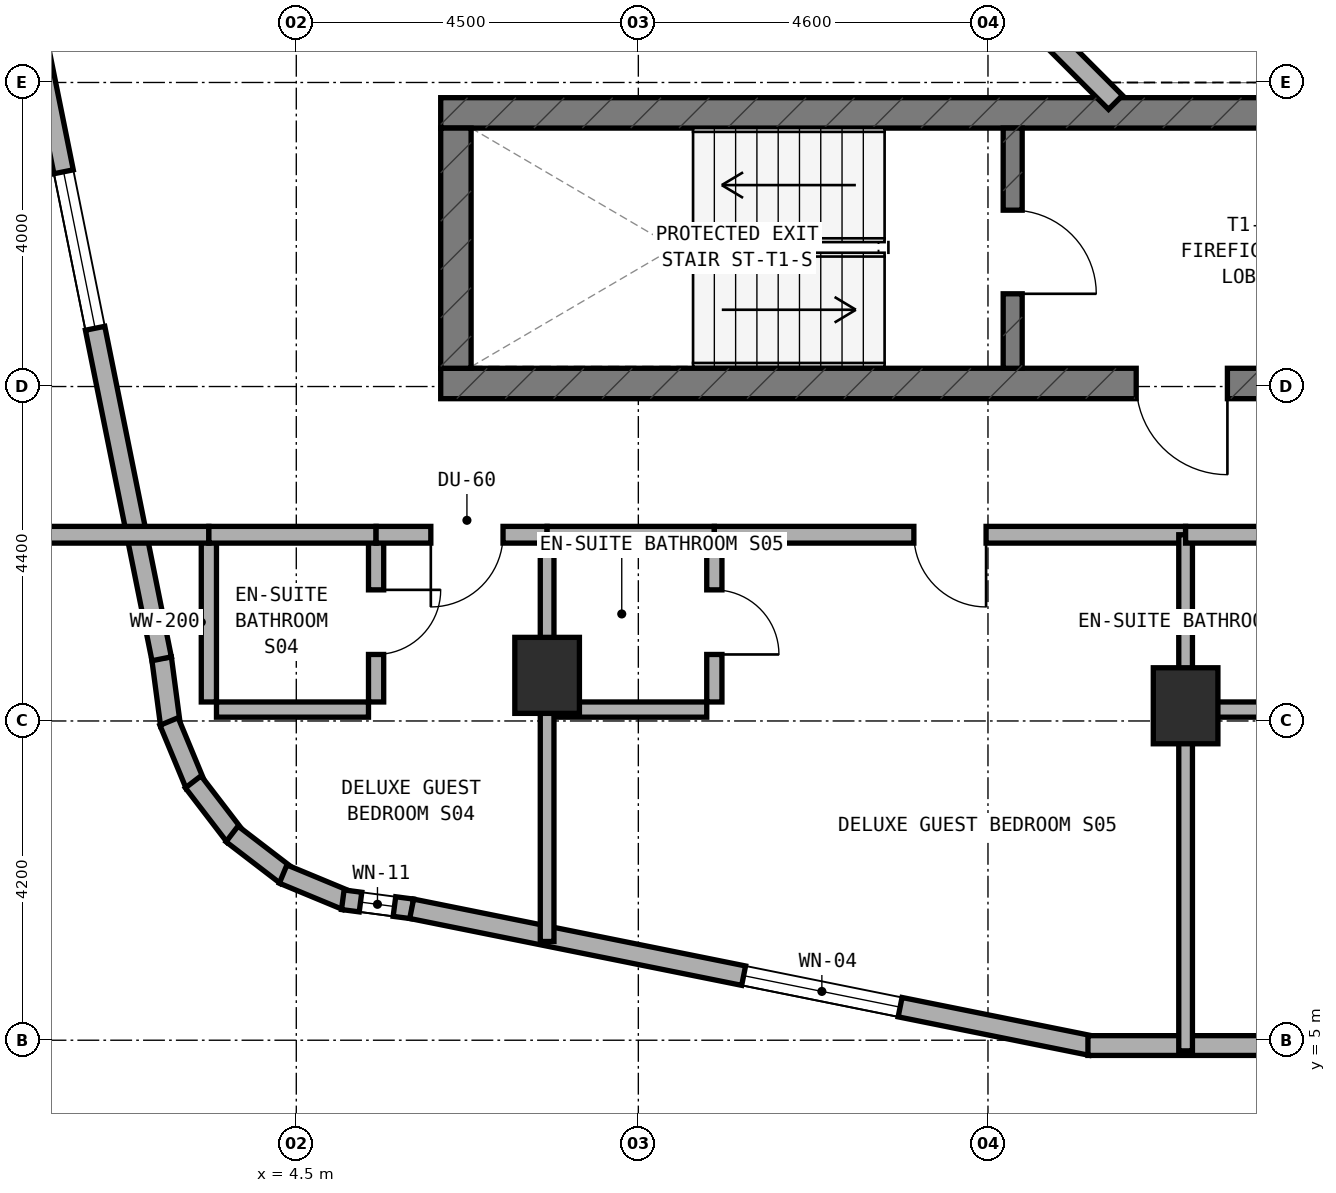
"""IFC4 building model, lengths in metres.
Left out: names, types, materials, properties, quantities, classifications, styles, units other than length and angle.
Written with IfcOpenShell. Run it as: python <this file> out.ifc"""

import sys

from ifc_helpers import new_model, si_unit, direction, frame, frame_2d, origin, origin_2d, place, context, subcontext, project, spatial, rectangle, extrude, element, fill, save


model = new_model("IFC4")
c1 = context("Model", 3, precision=1e-05, world=origin(), true_north=direction((0.0, 1.0)))
c2 = subcontext(c1, "Body", "Model", "MODEL_VIEW")
j1 = project(units=[si_unit("LENGTHUNIT", "METRE"), si_unit("PLANEANGLEUNIT", "RADIAN")], contexts=[c1])
p1 = place(None, origin())
s1 = spatial("IfcSite", under=j1, at=p1, CompositionType="ELEMENT")
p2 = place(p1, origin())
s2 = spatial("IfcBuilding", under=s1, at=p2, CompositionType="ELEMENT")
p3 = place(p2, frame((0.0, 0.0, 134.5)))
s3 = spatial("IfcBuildingStorey", under=s2, at=p3, CompositionType="ELEMENT", Elevation=134.5)
p4 = place(p3, frame((6.4, 13.64, 0.0), z_axis=(0.0, 0.0, 1.0), x_axis=(1.0, 0.0, 0.0)))
e1 = element("IfcWall", 1, at=p4, inside=s3, PredefinedType="SHEAR", context=c2, shape_type="SweptSolid", body=[
    extrude(rectangle(XDim=24.4, YDim=0.4, at=frame_2d((12.2, 0.0))), origin(), (0.0, 0.0, 1.0), 3.5),
])
p5 = place(p4, frame((9.15, 0.0, 0.0)))
e2 = element("IfcOpeningElement", 2, at=p5, cuts=e1, PredefinedType="OPENING", context=c2, shape_type="SweptSolid", body=[
    extrude(rectangle(XDim=1.2, YDim=2.15, at=frame_2d((0.6, 1.075))), frame((0.0, 0.21, 0.0), z_axis=(0.0, -1.0, 0.0), x_axis=(1.0, 0.0, 0.0)), (0.0, 0.0, 1.0), 0.42),
])
p6 = place(p4, frame((16.94, 0.0, 0.0)))
e3 = element("IfcOpeningElement", 3, at=p6, cuts=e1, PredefinedType="OPENING", context=c2, shape_type="SweptSolid", body=[
    extrude(rectangle(XDim=0.85, YDim=2.1, at=frame_2d((0.425, 1.05))), frame((0.0, 0.21, 0.0), z_axis=(0.0, -1.0, 0.0), x_axis=(1.0, 0.0, 0.0)), (0.0, 0.0, 1.0), 0.42),
])
p7 = place(p4, frame((18.783, 0.0, 0.0)))
e4 = element("IfcOpeningElement", 4, at=p7, cuts=e1, PredefinedType="OPENING", context=c2, shape_type="SweptSolid", body=[
    extrude(rectangle(XDim=1.1, YDim=2.15, at=frame_2d((0.55, 1.075))), frame((0.0, 0.21, 0.0), z_axis=(0.0, -1.0, 0.0), x_axis=(1.0, 0.0, 0.0)), (0.0, 0.0, 1.0), 0.42),
])
p8 = place(p4, frame((20.65, 0.0, 0.0)))
e5 = element("IfcOpeningElement", 5, at=p8, cuts=e1, PredefinedType="OPENING", context=c2, shape_type="SweptSolid", body=[
    extrude(rectangle(XDim=1.1, YDim=2.15, at=frame_2d((0.55, 1.075))), frame((0.0, 0.21, 0.0), z_axis=(0.0, -1.0, 0.0), x_axis=(1.0, 0.0, 0.0)), (0.0, 0.0, 1.0), 0.42),
])
p9 = place(p4, frame((22.517, 0.0, 0.0)))
e6 = element("IfcOpeningElement", 6, at=p9, cuts=e1, PredefinedType="OPENING", context=c2, shape_type="SweptSolid", body=[
    extrude(rectangle(XDim=1.1, YDim=2.15, at=frame_2d((0.55, 1.075))), frame((0.0, 0.21, 0.0), z_axis=(0.0, -1.0, 0.0), x_axis=(1.0, 0.0, 0.0)), (0.0, 0.0, 1.0), 0.42),
])
p10 = place(p3, frame((6.4, 17.2, 0.0), z_axis=(0.0, 0.0, 1.0), x_axis=(1.0, 0.0, 0.0)))
e7 = element("IfcWall", 7, at=p10, inside=s3, PredefinedType="SHEAR", context=c2, shape_type="SweptSolid", body=[
    extrude(rectangle(XDim=24.4, YDim=0.4, at=frame_2d((12.2, 0.0))), origin(), (0.0, 0.0, 1.0), 3.5),
])
p11 = place(p3, frame((6.6, 13.84, 0.0), z_axis=(0.0, 0.0, 1.0), x_axis=(0.0, 1.0, 0.0)))
e8 = element("IfcWall", 8, at=p11, inside=s3, PredefinedType="SHEAR", context=c2, shape_type="SweptSolid", body=[
    extrude(rectangle(XDim=3.16, YDim=0.4, at=frame_2d((1.58, 0.0))), origin(), (0.0, 0.0, 1.0), 3.5),
])
p12 = place(p3, frame((13.925, 13.84, 0.0), z_axis=(0.0, 0.0, 1.0), x_axis=(0.0, 1.0, 0.0)))
e9 = element("IfcWall", 9, at=p12, inside=s3, PredefinedType="STANDARD", context=c2, shape_type="SweptSolid", body=[
    extrude(rectangle(XDim=3.16, YDim=0.25, at=frame_2d((1.58, 0.0))), origin(), (0.0, 0.0, 1.0), 3.22),
])
p13 = place(p12, frame((0.98, 0.0, 0.0)))
e10 = element("IfcOpeningElement", 10, at=p13, cuts=e9, PredefinedType="OPENING", context=c2, shape_type="SweptSolid", body=[
    extrude(rectangle(XDim=1.1, YDim=2.15, at=frame_2d((0.55, 1.075))), frame((0.0, 0.135, 0.0), z_axis=(0.0, -1.0, 0.0), x_axis=(1.0, 0.0, 0.0)), (0.0, 0.0, 1.0), 0.27),
])
for number, where, z_axis, x_axis in (
    (11, (16.2, 9.4, 0.0), (0.0, 0.0, 1.0), (1.0, 0.0, 0.0)),
    (12, (7.8, 9.8, 0.0), (0.0, 0.0, 1.0), (1.0, 0.0, 0.0)),
):
    element("IfcColumn", number, at=place(p3, frame(where, z_axis=z_axis, x_axis=x_axis)), inside=s3, PredefinedType="COLUMN", context=c2, shape_type="SweptSolid", body=[
        extrude(rectangle(XDim=0.85, YDim=1.0, at=origin_2d()), origin(), (0.0, 0.0, 1.0), 3.5),
    ])
p14 = place(p3, frame((2.728, 10.025, 0.0), z_axis=(0.0, 0.0, 1.0), x_axis=(0.130953706898, -0.991388484223, 0.0)))
e13 = element("IfcWall", 13, at=p14, inside=s3, PredefinedType="STANDARD", context=c2, shape_type="SweptSolid", body=[
    extrude(rectangle(XDim=0.885, YDim=0.26, at=frame_2d((0.443, 0.0))), origin(), (0.0, 0.0, 1.0), 3.22),
])
p15 = place(p3, frame((2.826, 9.193, 0.0), z_axis=(0.0, 0.0, 1.0), x_axis=(0.383290660547, -0.923627776508, 0.0)))
e14 = element("IfcWall", 14, at=p15, inside=s3, PredefinedType="STANDARD", context=c2, shape_type="SweptSolid", body=[
    extrude(rectangle(XDim=0.903, YDim=0.26, at=frame_2d((0.452, 0.0))), origin(), (0.0, 0.0, 1.0), 3.22),
])
p16 = place(p3, frame((3.144, 8.399, 0.0), z_axis=(0.0, 0.0, 1.0), x_axis=(0.608624690463, -0.793458244748, 0.0)))
e15 = element("IfcWall", 15, at=p16, inside=s3, PredefinedType="STANDARD", context=c2, shape_type="SweptSolid", body=[
    extrude(rectangle(XDim=0.902, YDim=0.26, at=frame_2d((0.451, 0.0))), origin(), (0.0, 0.0, 1.0), 3.22),
])
p17 = place(p3, frame((3.655, 7.714, 0.0), z_axis=(0.0, 0.0, 1.0), x_axis=(0.793558456666, -0.608494022858, 0.0)))
e16 = element("IfcWall", 16, at=p17, inside=s3, PredefinedType="STANDARD", context=c2, shape_type="SweptSolid", body=[
    extrude(rectangle(XDim=0.902, YDim=0.26, at=frame_2d((0.451, 0.0))), origin(), (0.0, 0.0, 1.0), 3.22),
])
p18 = place(p3, frame((4.327, 7.186, 0.0), z_axis=(0.0, 0.0, 1.0), x_axis=(0.923683767999, -0.383155708213, 0.0)))
e17 = element("IfcWall", 17, at=p18, inside=s3, PredefinedType="STANDARD", context=c2, shape_type="SweptSolid", body=[
    extrude(rectangle(XDim=0.903, YDim=0.26, at=frame_2d((0.451, 0.0))), origin(), (0.0, 0.0, 1.0), 3.22),
])
p19 = place(p3, frame((5.112, 6.848, 0.0), z_axis=(0.0, 0.0, 1.0), x_axis=(0.991487658083, -0.130200706103, 0.0)))
e18 = element("IfcWall", 18, at=p19, inside=s3, PredefinedType="STANDARD", context=c2, shape_type="SweptSolid", body=[
    extrude(rectangle(XDim=0.921, YDim=0.26, at=frame_2d((0.46, 0.0))), origin(), (0.0, 0.0, 1.0), 3.22),
])
p20 = place(p19, frame((0.235, 0.0, 0.85)))
e19 = element("IfcOpeningElement", 19, at=p20, cuts=e18, PredefinedType="OPENING", context=c2, shape_type="SweptSolid", body=[
    extrude(rectangle(XDim=0.45, YDim=1.5, at=frame_2d((0.225, 0.75))), frame((0.0, 0.14, 0.0), z_axis=(0.0, -1.0, 0.0), x_axis=(1.0, 0.0, 0.0)), (0.0, 0.0, 1.0), 0.28),
])
p21 = place(p3, frame((6.018, 6.729, 0.0), z_axis=(0.0, 0.0, 1.0), x_axis=(0.980317172899, -0.197429077186, 0.0)))
e20 = element("IfcWall", 20, at=p21, inside=s3, PredefinedType="STANDARD", context=c2, shape_type="SweptSolid", body=[
    extrude(rectangle(XDim=9.117, YDim=0.26, at=frame_2d((4.559, 0.0))), origin(), (0.0, 0.0, 1.0), 3.22),
])
p22 = place(p21, frame((4.455, 0.0, 0.85)))
e21 = element("IfcOpeningElement", 21, at=p22, cuts=e20, PredefinedType="OPENING", context=c2, shape_type="SweptSolid", body=[
    extrude(rectangle(XDim=2.1, YDim=1.5, at=frame_2d((1.05, 0.75))), frame((0.0, 0.14, 0.0), z_axis=(0.0, -1.0, 0.0), x_axis=(1.0, 0.0, 0.0)), (0.0, 0.0, 1.0), 0.28),
])
p23 = place(p3, frame((14.915, 4.93, 0.0), z_axis=(0.0, 0.0, 1.0), x_axis=(1.0, 0.0, 0.0)))
e22 = element("IfcWall", 22, at=p23, inside=s3, PredefinedType="STANDARD", context=c2, shape_type="SweptSolid", body=[
    extrude(rectangle(XDim=12.135, YDim=0.26, at=frame_2d((6.067, 0.0))), origin(), (0.0, 0.0, 1.0), 3.22),
])
p24 = place(p23, frame((5.485, 0.0, 0.0)))
e23 = element("IfcOpeningElement", 23, at=p24, cuts=e22, PredefinedType="OPENING", context=c2, shape_type="SweptSolid", body=[
    extrude(rectangle(XDim=1.2, YDim=2.15, at=frame_2d((0.6, 1.075))), frame((0.0, 0.14, 0.0), z_axis=(0.0, -1.0, 0.0), x_axis=(1.0, 0.0, 0.0)), (0.0, 0.0, 1.0), 0.28),
])
p25 = place(p23, frame((2.26, 0.0, 0.85)))
e24 = element("IfcOpeningElement", 24, at=p25, cuts=e22, PredefinedType="OPENING", context=c2, shape_type="SweptSolid", body=[
    extrude(rectangle(XDim=2.1, YDim=1.5, at=frame_2d((1.05, 0.75))), frame((0.0, 0.14, 0.0), z_axis=(0.0, -1.0, 0.0), x_axis=(1.0, 0.0, 0.0)), (0.0, 0.0, 1.0), 0.28),
])
p26 = place(p23, frame((7.61, 0.0, 0.85)))
e25 = element("IfcOpeningElement", 25, at=p26, cuts=e22, PredefinedType="OPENING", context=c2, shape_type="SweptSolid", body=[
    extrude(rectangle(XDim=2.1, YDim=1.5, at=frame_2d((1.05, 0.75))), frame((0.0, 0.14, 0.0), z_axis=(0.0, -1.0, 0.0), x_axis=(1.0, 0.0, 0.0)), (0.0, 0.0, 1.0), 0.28),
])
p27 = place(p3, frame((0.916, 19.02, 0.0), z_axis=(0.0, 0.0, 1.0), x_axis=(0.197435082048, -0.980315963543, 0.0)))
e26 = element("IfcWall", 26, at=p27, inside=s3, PredefinedType="STANDARD", context=c2, shape_type="SweptSolid", body=[
    extrude(rectangle(XDim=9.183, YDim=0.26, at=frame_2d((4.591, 0.0))), origin(), (0.0, 0.0, 1.0), 3.22),
])
p28 = place(p27, frame((2.647, 0.0, 0.85)))
e27 = element("IfcOpeningElement", 27, at=p28, cuts=e26, PredefinedType="OPENING", context=c2, shape_type="SweptSolid", body=[
    extrude(rectangle(XDim=2.1, YDim=1.5, at=frame_2d((1.05, 0.75))), frame((0.0, 0.14, 0.0), z_axis=(0.0, -1.0, 0.0), x_axis=(1.0, 0.0, 0.0)), (0.0, 0.0, 1.0), 0.28),
])
p29 = place(p3, frame((13.444, 19.172, 0.0), z_axis=(0.0, 0.0, 1.0), x_axis=(0.707059717605, -0.707153841636, 0.0)))
e28 = element("IfcWall", 28, at=p29, inside=s3, PredefinedType="STANDARD", context=c2, shape_type="SweptSolid", body=[
    extrude(rectangle(XDim=2.594, YDim=0.26, at=frame_2d((1.297, 0.0))), origin(), (0.0, 0.0, 1.0), 3.22),
])
p30 = place(p3, frame((5.55, 9.45, 0.0), z_axis=(0.0, 0.0, 1.0), x_axis=(0.0, 1.0, 0.0)))
e29 = element("IfcWall", 29, at=p30, inside=s3, PredefinedType="PLUMBINGWALL", context=c2, shape_type="SweptSolid", body=[
    extrude(rectangle(XDim=2.1, YDim=0.2, at=frame_2d((1.05, 0.0))), origin(), (0.0, 0.0, 1.0), 3.22),
])
p31 = place(p30, frame((0.625, 0.0, 0.0)))
e30 = element("IfcOpeningElement", 30, at=p31, cuts=e29, PredefinedType="OPENING", context=c2, shape_type="SweptSolid", body=[
    extrude(rectangle(XDim=0.85, YDim=2.1, at=frame_2d((0.425, 1.05))), frame((0.0, 0.11, 0.0), z_axis=(0.0, -1.0, 0.0), x_axis=(1.0, 0.0, 0.0)), (0.0, 0.0, 1.0), 0.22),
])
p32 = place(p3, frame((3.45, 9.35, 0.0), z_axis=(0.0, 0.0, 1.0), x_axis=(1.0, 0.0, 0.0)))
e31 = element("IfcWall", 31, at=p32, inside=s3, PredefinedType="PLUMBINGWALL", context=c2, shape_type="SweptSolid", body=[
    extrude(rectangle(XDim=2.0, YDim=0.2, at=frame_2d((1.0, 0.0))), origin(), (0.0, 0.0, 1.0), 3.22),
])
p33 = place(p3, frame((3.35, 9.45, 0.0), z_axis=(0.0, 0.0, 1.0), x_axis=(0.0, 1.0, 0.0)))
e32 = element("IfcWall", 32, at=p33, inside=s3, PredefinedType="PLUMBINGWALL", context=c2, shape_type="SweptSolid", body=[
    extrude(rectangle(XDim=2.1, YDim=0.2, at=frame_2d((1.05, 0.0))), origin(), (0.0, 0.0, 1.0), 3.22),
])
p34 = place(p3, frame((0.96, 11.65, 0.0), z_axis=(0.0, 0.0, 1.0), x_axis=(1.0, 0.0, 0.0)))
e33 = element("IfcWall", 33, at=p34, inside=s3, PredefinedType="SOLIDWALL", context=c2, shape_type="SweptSolid", body=[
    extrude(rectangle(XDim=2.39, YDim=0.22, at=frame_2d((1.195, 0.0))), origin(), (0.0, 0.0, 1.0), 3.22),
])
p35 = place(p3, frame((3.35, 11.65, 0.0), z_axis=(0.0, 0.0, 1.0), x_axis=(1.0, 0.0, 0.0)))
e34 = element("IfcWall", 34, at=p35, inside=s3, PredefinedType="SOLIDWALL", context=c2, shape_type="SweptSolid", body=[
    extrude(rectangle(XDim=2.2, YDim=0.22, at=frame_2d((1.1, 0.0))), origin(), (0.0, 0.0, 1.0), 3.22),
])
p36 = place(p3, frame((5.55, 11.65, 0.0), z_axis=(0.0, 0.0, 1.0), x_axis=(1.0, 0.0, 0.0)))
e35 = element("IfcWall", 35, at=p36, inside=s3, PredefinedType="SOLIDWALL", context=c2, shape_type="SweptSolid", body=[
    extrude(rectangle(XDim=2.25, YDim=0.22, at=frame_2d((1.125, 0.0))), origin(), (0.0, 0.0, 1.0), 2.695),
])
p37 = place(p36, frame((0.72, 0.0, 0.0)))
e36 = element("IfcOpeningElement", 36, at=p37, cuts=e35, PredefinedType="OPENING", context=c2, shape_type="SweptSolid", body=[
    extrude(rectangle(XDim=0.95, YDim=2.1, at=frame_2d((0.475, 1.05))), frame((0.0, 0.12, 0.0), z_axis=(0.0, -1.0, 0.0), x_axis=(1.0, 0.0, 0.0)), (0.0, 0.0, 1.0), 0.24),
])
p38 = place(p3, frame((7.8, 6.299, 0.0), z_axis=(0.0, 0.0, 1.0), x_axis=(0.0, 1.0, 0.0)))
e37 = element("IfcWall", 37, at=p38, inside=s3, PredefinedType="SOLIDWALL", context=c2, shape_type="SweptSolid", body=[
    extrude(rectangle(XDim=5.351, YDim=0.18, at=frame_2d((2.675, 0.0))), origin(), (0.0, 0.0, 1.0), 2.695),
])
p39 = place(p3, frame((10.0, 9.45, 0.0), z_axis=(0.0, 0.0, 1.0), x_axis=(0.0, 1.0, 0.0)))
e38 = element("IfcWall", 38, at=p39, inside=s3, PredefinedType="PLUMBINGWALL", context=c2, shape_type="SweptSolid", body=[
    extrude(rectangle(XDim=2.1, YDim=0.2, at=frame_2d((1.05, 0.0))), origin(), (0.0, 0.0, 1.0), 2.835),
])
p40 = place(p39, frame((0.625, 0.0, 0.0)))
e39 = element("IfcOpeningElement", 39, at=p40, cuts=e38, PredefinedType="OPENING", context=c2, shape_type="SweptSolid", body=[
    extrude(rectangle(XDim=0.85, YDim=2.1, at=frame_2d((0.425, 1.05))), frame((0.0, 0.11, 0.0), z_axis=(0.0, -1.0, 0.0), x_axis=(1.0, 0.0, 0.0)), (0.0, 0.0, 1.0), 0.22),
])
p41 = place(p3, frame((7.9, 9.35, 0.0), z_axis=(0.0, 0.0, 1.0), x_axis=(1.0, 0.0, 0.0)))
e40 = element("IfcWall", 40, at=p41, inside=s3, PredefinedType="PLUMBINGWALL", context=c2, shape_type="SweptSolid", body=[
    extrude(rectangle(XDim=2.0, YDim=0.2, at=frame_2d((1.0, 0.0))), origin(), (0.0, 0.0, 1.0), 3.22),
])
p42 = place(p3, frame((7.8, 11.65, 0.0), z_axis=(0.0, 0.0, 1.0), x_axis=(1.0, 0.0, 0.0)))
e41 = element("IfcWall", 41, at=p42, inside=s3, PredefinedType="SOLIDWALL", context=c2, shape_type="SweptSolid", body=[
    extrude(rectangle(XDim=2.2, YDim=0.22, at=frame_2d((1.1, 0.0))), origin(), (0.0, 0.0, 1.0), 2.695),
])
p43 = place(p3, frame((10.0, 11.65, 0.0), z_axis=(0.0, 0.0, 1.0), x_axis=(1.0, 0.0, 0.0)))
e42 = element("IfcWall", 42, at=p43, inside=s3, PredefinedType="SOLIDWALL", context=c2, shape_type="SweptSolid", body=[
    extrude(rectangle(XDim=6.2, YDim=0.22, at=frame_2d((3.1, 0.0))), origin(), (0.0, 0.0, 1.0), 2.695),
])
p44 = place(p43, frame((2.625, 0.0, 0.0)))
e43 = element("IfcOpeningElement", 43, at=p44, cuts=e42, PredefinedType="OPENING", context=c2, shape_type="SweptSolid", body=[
    extrude(rectangle(XDim=0.95, YDim=2.1, at=frame_2d((0.475, 1.05))), frame((0.0, 0.12, 0.0), z_axis=(0.0, -1.0, 0.0), x_axis=(1.0, 0.0, 0.0)), (0.0, 0.0, 1.0), 0.24),
])
p45 = place(p3, frame((16.2, 4.86, 0.0), z_axis=(0.0, 0.0, 1.0), x_axis=(0.0, 1.0, 0.0)))
e44 = element("IfcWall", 44, at=p45, inside=s3, PredefinedType="SOLIDWALL", context=c2, shape_type="SweptSolid", body=[
    extrude(rectangle(XDim=6.79, YDim=0.18, at=frame_2d((3.395, 0.0))), origin(), (0.0, 0.0, 1.0), 2.695),
])
p46 = place(p3, frame((16.3, 9.35, 0.0), z_axis=(0.0, 0.0, 1.0), x_axis=(1.0, 0.0, 0.0)))
e45 = element("IfcWall", 45, at=p46, inside=s3, PredefinedType="PLUMBINGWALL", context=c2, shape_type="SweptSolid", body=[
    extrude(rectangle(XDim=2.0, YDim=0.2, at=frame_2d((1.0, 0.0))), origin(), (0.0, 0.0, 1.0), 2.835),
])
p47 = place(p3, frame((16.2, 11.65, 0.0), z_axis=(0.0, 0.0, 1.0), x_axis=(1.0, 0.0, 0.0)))
e46 = element("IfcWall", 46, at=p47, inside=s3, PredefinedType="SOLIDWALL", context=c2, shape_type="SweptSolid", body=[
    extrude(rectangle(XDim=2.2, YDim=0.22, at=frame_2d((1.1, 0.0))), origin(), (0.0, 0.0, 1.0), 2.695),
])
p48 = place(p22, origin())
e47 = element("IfcWindow", 47, at=p48, inside=s3, PartitioningType="SINGLE_PANEL", PredefinedType="WINDOW", context=c2, shape_type="SweptSolid", body=[
    extrude(rectangle(XDim=2.1, YDim=1.5, at=frame_2d((1.05, 0.75))), frame((0.0, 0.03, 0.0), z_axis=(0.0, -1.0, 0.0), x_axis=(1.0, 0.0, 0.0)), (0.0, 0.0, 1.0), 0.06),
])
fill(e21, e47)
p49 = place(p28, origin())
e48 = element("IfcWindow", 48, at=p49, inside=s3, PartitioningType="SINGLE_PANEL", PredefinedType="WINDOW", context=c2, shape_type="SweptSolid", body=[
    extrude(rectangle(XDim=2.1, YDim=1.5, at=frame_2d((1.05, 0.75))), frame((0.0, 0.03, 0.0), z_axis=(0.0, -1.0, 0.0), x_axis=(1.0, 0.0, 0.0)), (0.0, 0.0, 1.0), 0.06),
])
fill(e27, e48)
p50 = place(p20, origin())
e49 = element("IfcWindow", 49, at=p50, inside=s3, PartitioningType="SINGLE_PANEL", PredefinedType="WINDOW", context=c2, shape_type="SweptSolid", body=[
    extrude(rectangle(XDim=0.45, YDim=1.5, at=frame_2d((0.225, 0.75))), frame((0.0, 0.03, 0.0), z_axis=(0.0, -1.0, 0.0), x_axis=(1.0, 0.0, 0.0)), (0.0, 0.0, 1.0), 0.06),
])
fill(e19, e49)
p51 = place(p13, frame((1.1, 0.0, 0.0), z_axis=(0.0, 0.0, 1.0), x_axis=(-1.0, 0.0, 0.0)))
e50 = element("IfcDoor", 50, at=p51, inside=s3, OperationType="SINGLE_SWING_RIGHT", PredefinedType="DOOR", context=c2, shape_type="SweptSolid", body=[
    extrude(rectangle(XDim=1.1, YDim=2.15, at=frame_2d((0.55, 1.075))), frame((0.0, 0.025, 0.0), z_axis=(0.0, -1.0, 0.0), x_axis=(1.0, 0.0, 0.0)), (0.0, 0.0, 1.0), 0.05),
])
fill(e10, e50)
p52 = place(p5, frame((1.2, 0.0, 0.0), z_axis=(0.0, 0.0, 1.0), x_axis=(-1.0, 0.0, 0.0)))
e51 = element("IfcDoor", 51, at=p52, inside=s3, OperationType="SINGLE_SWING_LEFT", PredefinedType="DOOR", context=c2, shape_type="SweptSolid", body=[
    extrude(rectangle(XDim=1.2, YDim=2.15, at=frame_2d((0.6, 1.075))), frame((0.0, 0.025, 0.0), z_axis=(0.0, -1.0, 0.0), x_axis=(1.0, 0.0, 0.0)), (0.0, 0.0, 1.0), 0.05),
])
fill(e2, e51)
p53 = place(p31, frame((0.85, 0.0, 0.0), z_axis=(0.0, 0.0, 1.0), x_axis=(-1.0, 0.0, 0.0)))
e52 = element("IfcDoor", 52, at=p53, inside=s3, OperationType="SINGLE_SWING_LEFT", PredefinedType="DOOR", context=c2, shape_type="SweptSolid", body=[
    extrude(rectangle(XDim=0.85, YDim=2.1, at=frame_2d((0.425, 1.05))), frame((0.0, 0.025, 0.0), z_axis=(0.0, -1.0, 0.0), x_axis=(1.0, 0.0, 0.0)), (0.0, 0.0, 1.0), 0.05),
])
fill(e30, e52)
p54 = place(p37, frame((0.95, 0.0, 0.0), z_axis=(0.0, 0.0, 1.0), x_axis=(-1.0, 0.0, 0.0)))
e53 = element("IfcDoor", 53, at=p54, inside=s3, OperationType="SINGLE_SWING_RIGHT", PredefinedType="DOOR", context=c2, shape_type="SweptSolid", body=[
    extrude(rectangle(XDim=0.95, YDim=2.1, at=frame_2d((0.475, 1.05))), frame((0.0, 0.025, 0.0), z_axis=(0.0, -1.0, 0.0), x_axis=(1.0, 0.0, 0.0)), (0.0, 0.0, 1.0), 0.05),
])
fill(e36, e53)
p55 = place(p40, frame((0.85, 0.0, 0.0), z_axis=(0.0, 0.0, 1.0), x_axis=(-1.0, 0.0, 0.0)))
e54 = element("IfcDoor", 54, at=p55, inside=s3, OperationType="SINGLE_SWING_RIGHT", PredefinedType="DOOR", context=c2, shape_type="SweptSolid", body=[
    extrude(rectangle(XDim=0.85, YDim=2.1, at=frame_2d((0.425, 1.05))), frame((0.0, 0.025, 0.0), z_axis=(0.0, -1.0, 0.0), x_axis=(1.0, 0.0, 0.0)), (0.0, 0.0, 1.0), 0.05),
])
fill(e39, e54)
p56 = place(p44, frame((0.95, 0.0, 0.0), z_axis=(0.0, 0.0, 1.0), x_axis=(-1.0, 0.0, 0.0)))
e55 = element("IfcDoor", 55, at=p56, inside=s3, OperationType="SINGLE_SWING_LEFT", PredefinedType="DOOR", context=c2, shape_type="SweptSolid", body=[
    extrude(rectangle(XDim=0.95, YDim=2.1, at=frame_2d((0.475, 1.05))), frame((0.0, 0.025, 0.0), z_axis=(0.0, -1.0, 0.0), x_axis=(1.0, 0.0, 0.0)), (0.0, 0.0, 1.0), 0.05),
])
fill(e43, e55)
save(model, sys.argv[1])
